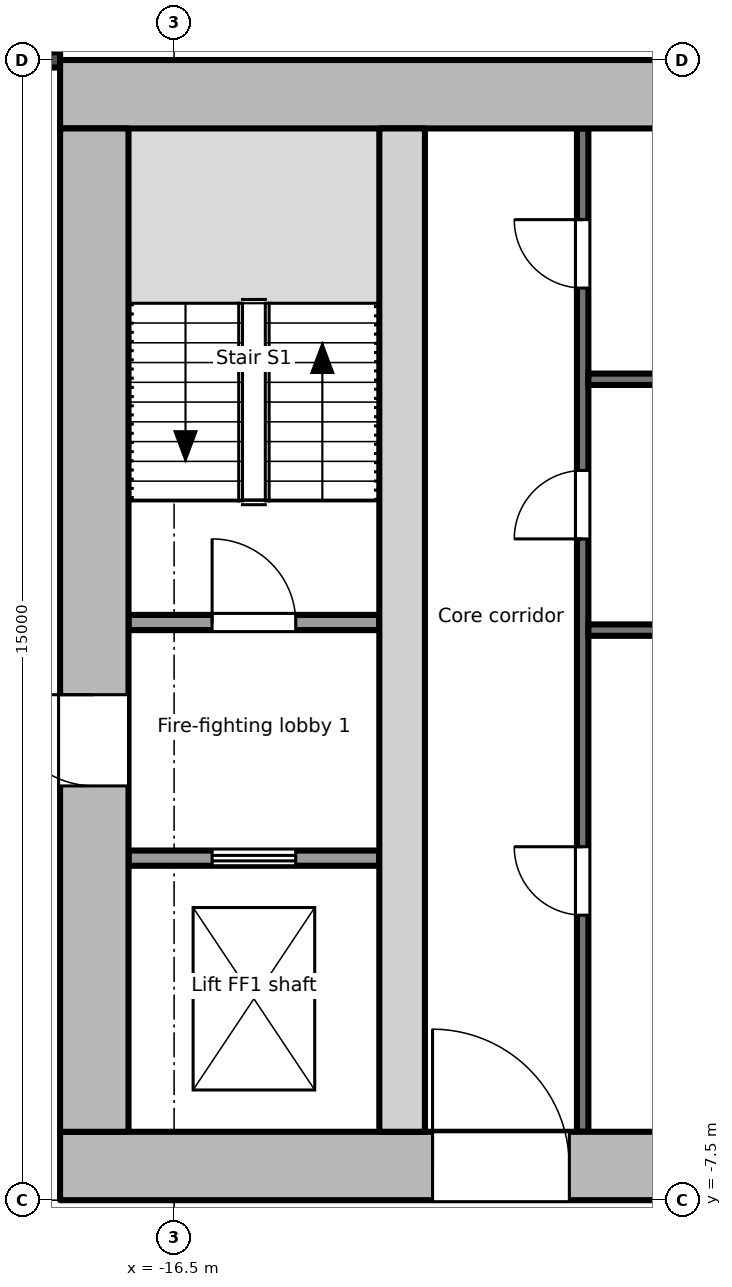
"""IFC4 building model, lengths in metres.
Left out: names, types, materials, properties, quantities, classifications, styles, units other than length and angle.
Written with IfcOpenShell. Run it as: python <this file> out.ifc"""

import sys

from ifc_helpers import new_model, si_unit, direction, frame, frame_2d, origin, place, context, subcontext, project, spatial, rectangle, extrude, element, fill, save


model = new_model("IFC4")
c1 = context("Model", 3, precision=1e-05, world=origin(), true_north=direction((0.0, 1.0)))
c2 = subcontext(c1, "Body", "Model", "MODEL_VIEW")
j1 = project(units=[si_unit("LENGTHUNIT", "METRE"), si_unit("PLANEANGLEUNIT", "RADIAN")], contexts=[c1])
p1 = place(None, origin())
s1 = spatial("IfcSite", under=j1, at=p1, CompositionType="ELEMENT")
p2 = place(p1, origin())
s2 = spatial("IfcBuilding", under=s1, at=p2, CompositionType="ELEMENT")
p3 = place(p2, frame((0.0, 0.0, 304.3)))
s3 = spatial("IfcBuildingStorey", under=s2, at=p3, CompositionType="ELEMENT", Elevation=304.3)
p4 = place(p3, frame((-18.0, -7.05, -0.2), z_axis=(0.0, 0.0, 1.0), x_axis=(1.0, 0.0, 0.0)))
e1 = element("IfcWall", 1, at=p4, inside=s3, PredefinedType="SHEAR", context=c2, shape_type="SweptSolid", body=[
    extrude(rectangle(XDim=36.0, YDim=0.9, at=frame_2d((18.0, 0.0))), origin(), (0.0, 0.0, 1.0), 4.0),
])
p5 = place(p4, frame((4.9, 0.0, 0.2)))
e2 = element("IfcOpeningElement", 2, at=p5, cuts=e1, PredefinedType="OPENING", context=c2, shape_type="SweptSolid", body=[
    extrude(rectangle(XDim=1.8, YDim=2.1, at=frame_2d((0.9, 1.05))), frame((0.0, 0.46, 0.0), z_axis=(0.0, -1.0, 0.0), x_axis=(1.0, 0.0, 0.0)), (0.0, 0.0, 1.0), 0.921),
])
p6 = place(p4, frame((13.9, 0.0, 0.2)))
e3 = element("IfcOpeningElement", 3, at=p6, cuts=e1, PredefinedType="OPENING", context=c2, shape_type="SweptSolid", body=[
    extrude(rectangle(XDim=1.8, YDim=2.1, at=frame_2d((0.9, 1.05))), frame((0.0, 0.46, 0.0), z_axis=(0.0, -1.0, 0.0), x_axis=(1.0, 0.0, 0.0)), (0.0, 0.0, 1.0), 0.921),
])
p7 = place(p4, frame((22.9, 0.0, 0.2)))
e4 = element("IfcOpeningElement", 4, at=p7, cuts=e1, PredefinedType="OPENING", context=c2, shape_type="SweptSolid", body=[
    extrude(rectangle(XDim=1.8, YDim=2.1, at=frame_2d((0.9, 1.05))), frame((0.0, 0.46, 0.0), z_axis=(0.0, -1.0, 0.0), x_axis=(1.0, 0.0, 0.0)), (0.0, 0.0, 1.0), 0.921),
])
p8 = place(p3, frame((-18.0, 7.05, -0.2), z_axis=(0.0, 0.0, 1.0), x_axis=(1.0, 0.0, 0.0)))
e5 = element("IfcWall", 5, at=p8, inside=s3, PredefinedType="SHEAR", context=c2, shape_type="SweptSolid", body=[
    extrude(rectangle(XDim=36.0, YDim=0.9, at=frame_2d((18.0, 0.0))), origin(), (0.0, 0.0, 1.0), 4.0),
])
p9 = place(p3, frame((-17.55, -6.6, -0.2), z_axis=(0.0, 0.0, 1.0), x_axis=(0.0, 1.0, 0.0)))
e6 = element("IfcWall", 6, at=p9, inside=s3, PredefinedType="SHEAR", context=c2, shape_type="SweptSolid", body=[
    extrude(rectangle(XDim=13.2, YDim=0.9, at=frame_2d((6.6, 0.0))), origin(), (0.0, 0.0, 1.0), 4.0),
])
p10 = place(p9, frame((4.55, 0.0, 0.2)))
e7 = element("IfcOpeningElement", 7, at=p10, cuts=e6, PredefinedType="OPENING", context=c2, shape_type="SweptSolid", body=[
    extrude(rectangle(XDim=1.2, YDim=2.1, at=frame_2d((0.6, 1.05))), frame((0.0, 0.46, 0.0), z_axis=(0.0, -1.0, 0.0), x_axis=(1.0, 0.0, 0.0)), (0.0, 0.0, 1.0), 0.921),
])
p11 = place(p3, frame((-13.5, -6.6, -0.2), z_axis=(0.0, 0.0, 1.0), x_axis=(0.0, 1.0, 0.0)))
e8 = element("IfcWall", 8, at=p11, inside=s3, PredefinedType="SHEAR", context=c2, shape_type="SweptSolid", body=[
    extrude(rectangle(XDim=13.2, YDim=0.6, at=frame_2d((6.6, 0.0))), origin(), (0.0, 0.0, 1.0), 4.0),
])
p12 = place(p3, frame((-17.1, -3.0, 0.0), z_axis=(0.0, 0.0, 1.0), x_axis=(1.0, 0.0, 0.0)))
e9 = element("IfcWall", 9, at=p12, inside=s3, PredefinedType="PARTITIONING", context=c2, shape_type="SweptSolid", body=[
    extrude(rectangle(XDim=3.3, YDim=0.2, at=frame_2d((1.65, 0.0))), origin(), (0.0, 0.0, 1.0), 3.8),
])
p13 = place(p12, frame((1.1, 0.0, 0.0)))
e10 = element("IfcOpeningElement", 10, at=p13, cuts=e9, PredefinedType="OPENING", context=c2, shape_type="SweptSolid", body=[
    extrude(rectangle(XDim=1.1, YDim=2.1, at=frame_2d((0.55, 1.05))), frame((0.0, 0.111, 0.0), z_axis=(0.0, -1.0, 0.0), x_axis=(1.0, 0.0, 0.0)), (0.0, 0.0, 1.0), 0.221),
])
p14 = place(p3, frame((-17.1, 0.1, 0.0), z_axis=(0.0, 0.0, 1.0), x_axis=(1.0, 0.0, 0.0)))
e11 = element("IfcWall", 11, at=p14, inside=s3, PredefinedType="PARTITIONING", context=c2, shape_type="SweptSolid", body=[
    extrude(rectangle(XDim=3.3, YDim=0.2, at=frame_2d((1.65, 0.0))), origin(), (0.0, 0.0, 1.0), 3.8),
])
p15 = place(p14, frame((1.1, 0.0, 0.0)))
e12 = element("IfcOpeningElement", 12, at=p15, cuts=e11, PredefinedType="OPENING", context=c2, shape_type="SweptSolid", body=[
    extrude(rectangle(XDim=1.1, YDim=2.1, at=frame_2d((0.55, 1.05))), frame((0.0, 0.111, 0.0), z_axis=(0.0, -1.0, 0.0), x_axis=(1.0, 0.0, 0.0)), (0.0, 0.0, 1.0), 0.221),
])
p16 = place(p3, frame((-11.125, -6.6, 0.0), z_axis=(0.0, 0.0, 1.0), x_axis=(0.0, 1.0, 0.0)))
e13 = element("IfcWall", 13, at=p16, inside=s3, PredefinedType="PARTITIONING", context=c2, shape_type="SweptSolid", body=[
    extrude(rectangle(XDim=13.2, YDim=0.15, at=frame_2d((6.6, 0.0))), origin(), (0.0, 0.0, 1.0), 3.8),
])
p17 = place(p16, frame((2.85, 0.0, 0.0)))
e14 = element("IfcOpeningElement", 14, at=p17, cuts=e13, PredefinedType="OPENING", context=c2, shape_type="SweptSolid", body=[
    extrude(rectangle(XDim=0.9, YDim=2.1, at=frame_2d((0.45, 1.05))), frame((0.0, 0.085, 0.0), z_axis=(0.0, -1.0, 0.0), x_axis=(1.0, 0.0, 0.0)), (0.0, 0.0, 1.0), 0.171),
])
p18 = place(p16, frame((7.8, 0.0, 0.0)))
e15 = element("IfcOpeningElement", 15, at=p18, cuts=e13, PredefinedType="OPENING", context=c2, shape_type="SweptSolid", body=[
    extrude(rectangle(XDim=0.9, YDim=2.1, at=frame_2d((0.45, 1.05))), frame((0.0, 0.085, 0.0), z_axis=(0.0, -1.0, 0.0), x_axis=(1.0, 0.0, 0.0)), (0.0, 0.0, 1.0), 0.171),
])
p19 = place(p16, frame((11.1, 0.0, 0.0)))
e16 = element("IfcOpeningElement", 16, at=p19, cuts=e13, PredefinedType="OPENING", context=c2, shape_type="SweptSolid", body=[
    extrude(rectangle(XDim=0.9, YDim=2.1, at=frame_2d((0.45, 1.05))), frame((0.0, 0.085, 0.0), z_axis=(0.0, -1.0, 0.0), x_axis=(1.0, 0.0, 0.0)), (0.0, 0.0, 1.0), 0.171),
])
for number, where, z_axis, x_axis in (
    (17, (-11.05, 0.0, 0.0), (0.0, 0.0, 1.0), (1.0, 0.0, 0.0)),
    (18, (-11.05, 3.3, 0.0), (0.0, 0.0, 1.0), (1.0, 0.0, 0.0)),
):
    element("IfcWall", number, at=place(p3, frame(where, z_axis=z_axis, x_axis=x_axis)), inside=s3, PredefinedType="PARTITIONING", context=c2, shape_type="SweptSolid", body=[
        extrude(rectangle(XDim=6.25, YDim=0.15, at=frame_2d((3.125, 0.0))), origin(), (0.0, 0.0, 1.0), 3.8),
    ])
p20 = place(p3, frame((-20.6, 7.501, 0.0), z_axis=(0.0, 0.0, 1.0), x_axis=(1.0, 0.0, 0.0)))
e19 = element("IfcWall", 19, at=p20, inside=s3, PredefinedType="PARTITIONING", context=c2, shape_type="SweptSolid", body=[
    extrude(rectangle(XDim=2.6, YDim=0.2, at=frame_2d((1.3, 0.0))), origin(), (0.0, 0.0, 1.0), 3.8),
])
p21 = place(p13, origin())
e20 = element("IfcDoor", 20, at=p21, inside=s3, OperationType="DOUBLE_DOOR_SLIDING", PredefinedType="DOOR", context=c2, shape_type="SweptSolid", body=[
    extrude(rectangle(XDim=1.1, YDim=2.1, at=frame_2d((0.55, 1.05))), frame((0.0, 0.025, 0.0), z_axis=(0.0, -1.0, 0.0), x_axis=(1.0, 0.0, 0.0)), (0.0, 0.0, 1.0), 0.05),
])
fill(e10, e20)
p22 = place(p10, origin())
e21 = element("IfcDoor", 21, at=p22, inside=s3, OperationType="SINGLE_SWING_RIGHT", PredefinedType="DOOR", context=c2, shape_type="SweptSolid", body=[
    extrude(rectangle(XDim=1.2, YDim=2.1, at=frame_2d((0.6, 1.05))), frame((0.0, 0.025, 0.0), z_axis=(0.0, -1.0, 0.0), x_axis=(1.0, 0.0, 0.0)), (0.0, 0.0, 1.0), 0.05),
])
fill(e7, e21)
p23 = place(p15, origin())
e22 = element("IfcDoor", 22, at=p23, inside=s3, OperationType="SINGLE_SWING_LEFT", PredefinedType="DOOR", context=c2, shape_type="SweptSolid", body=[
    extrude(rectangle(XDim=1.1, YDim=2.1, at=frame_2d((0.55, 1.05))), frame((0.0, 0.025, 0.0), z_axis=(0.0, -1.0, 0.0), x_axis=(1.0, 0.0, 0.0)), (0.0, 0.0, 1.0), 0.05),
])
fill(e12, e22)
p24 = place(p17, origin())
e23 = element("IfcDoor", 23, at=p24, inside=s3, OperationType="SINGLE_SWING_RIGHT", PredefinedType="DOOR", context=c2, shape_type="SweptSolid", body=[
    extrude(rectangle(XDim=0.9, YDim=2.1, at=frame_2d((0.45, 1.05))), frame((0.0, 0.025, 0.0), z_axis=(0.0, -1.0, 0.0), x_axis=(1.0, 0.0, 0.0)), (0.0, 0.0, 1.0), 0.05),
])
fill(e14, e23)
p25 = place(p18, origin())
e24 = element("IfcDoor", 24, at=p25, inside=s3, OperationType="SINGLE_SWING_LEFT", PredefinedType="DOOR", context=c2, shape_type="SweptSolid", body=[
    extrude(rectangle(XDim=0.9, YDim=2.1, at=frame_2d((0.45, 1.05))), frame((0.0, 0.025, 0.0), z_axis=(0.0, -1.0, 0.0), x_axis=(1.0, 0.0, 0.0)), (0.0, 0.0, 1.0), 0.05),
])
fill(e15, e24)
p26 = place(p19, origin())
e25 = element("IfcDoor", 25, at=p26, inside=s3, OperationType="SINGLE_SWING_RIGHT", PredefinedType="DOOR", context=c2, shape_type="SweptSolid", body=[
    extrude(rectangle(XDim=0.9, YDim=2.1, at=frame_2d((0.45, 1.05))), frame((0.0, 0.025, 0.0), z_axis=(0.0, -1.0, 0.0), x_axis=(1.0, 0.0, 0.0)), (0.0, 0.0, 1.0), 0.05),
])
fill(e16, e25)
p27 = place(p5, origin())
e26 = element("IfcDoor", 26, at=p27, inside=s3, OperationType="SINGLE_SWING_LEFT", PredefinedType="DOOR", context=c2, shape_type="SweptSolid", body=[
    extrude(rectangle(XDim=1.8, YDim=2.1, at=frame_2d((0.9, 1.05))), frame((0.0, 0.025, 0.0), z_axis=(0.0, -1.0, 0.0), x_axis=(1.0, 0.0, 0.0)), (0.0, 0.0, 1.0), 0.05),
])
fill(e2, e26)
save(model, sys.argv[1])
